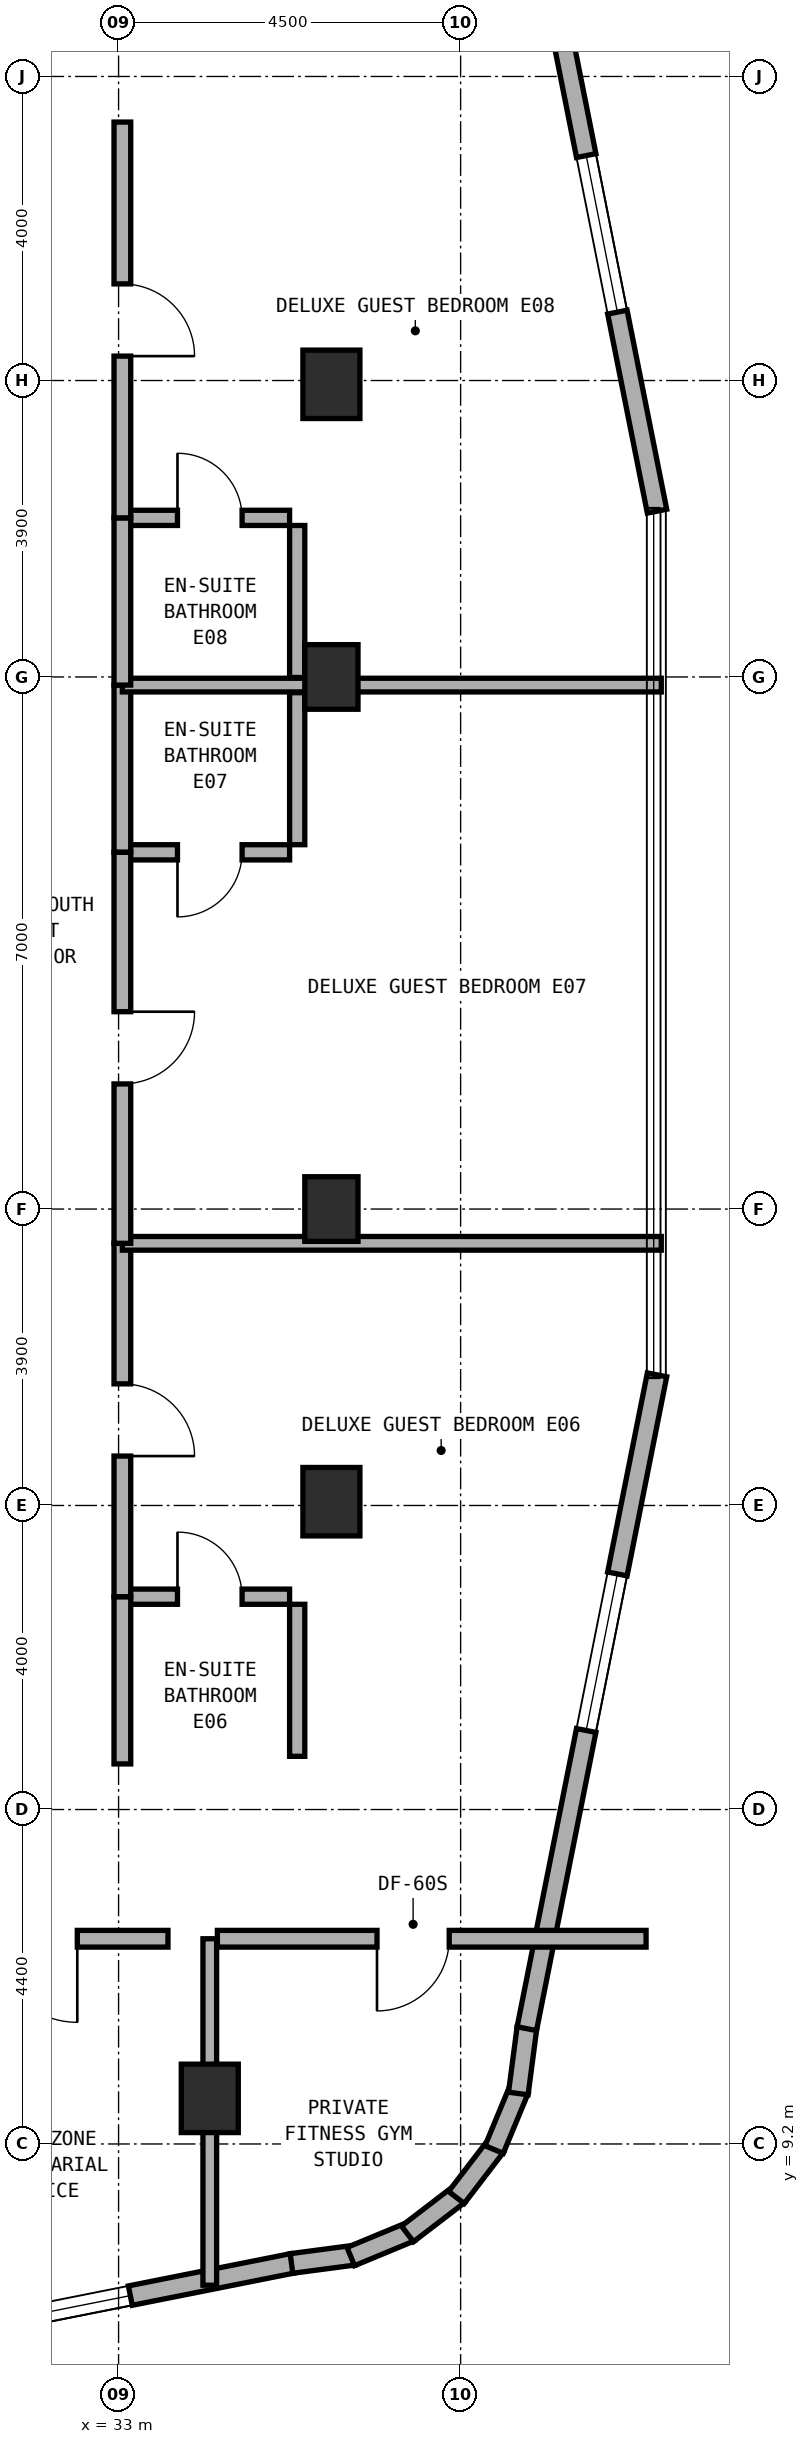
"""IFC4 building model, lengths in metres.
Left out: names, types, materials, properties, quantities, classifications, styles, units other than length and angle.
Written with IfcOpenShell. Run it as: python <this file> out.ifc"""

import sys

from ifc_helpers import new_model, si_unit, direction, frame, frame_2d, origin, origin_2d, place, context, subcontext, project, spatial, rectangle, extrude, element, fill, save


model = new_model("IFC4")
c1 = context("Model", 3, precision=1e-05, world=origin(), true_north=direction((0.0, 1.0)))
c2 = subcontext(c1, "Body", "Model", "MODEL_VIEW")
j1 = project(units=[si_unit("LENGTHUNIT", "METRE"), si_unit("PLANEANGLEUNIT", "RADIAN")], contexts=[c1])
p1 = place(None, origin())
s1 = spatial("IfcSite", under=j1, at=p1, CompositionType="ELEMENT")
p2 = place(p1, origin())
s2 = spatial("IfcBuilding", under=s1, at=p2, CompositionType="ELEMENT")
p3 = place(p2, frame((0.0, 0.0, 231.5)))
s3 = spatial("IfcBuildingStorey", under=s2, at=p3, CompositionType="ELEMENT", Elevation=231.5)
p4 = place(p3, frame((34.2, 9.8, 0.0), z_axis=(0.0, 0.0, 1.0), x_axis=(1.0, 0.0, 0.0)))
e1 = element("IfcColumn", 1, at=p4, inside=s3, PredefinedType="COLUMN", context=c2, shape_type="SweptSolid", body=[
    extrude(rectangle(XDim=0.75, YDim=0.9, at=origin_2d()), origin(), (0.0, 0.0, 1.0), 3.6),
])
for number, where, z_axis, x_axis in (
    (2, (35.8, 21.5, 0.0), (0.0, 0.0, 1.0), (1.0, 0.0, 0.0)),
    (3, (35.8, 28.5, 0.0), (0.0, 0.0, 1.0), (1.0, 0.0, 0.0)),
):
    element("IfcColumn", number, at=place(p3, frame(where, z_axis=z_axis, x_axis=x_axis)), inside=s3, PredefinedType="COLUMN", context=c2, shape_type="SweptSolid", body=[
        extrude(rectangle(XDim=0.7, YDim=0.85, at=origin_2d()), origin(), (0.0, 0.0, 1.0), 3.6),
    ])
for number, where, z_axis, x_axis in (
    (4, (35.8, 17.65, 0.0), (0.0, 0.0, 1.0), (1.0, 0.0, 0.0)),
    (5, (35.8, 32.35, 0.0), (0.0, 0.0, 1.0), (1.0, 0.0, 0.0)),
):
    element("IfcColumn", number, at=place(p3, frame(where, z_axis=z_axis, x_axis=x_axis)), inside=s3, PredefinedType="COLUMN", context=c2, shape_type="SweptSolid", body=[
        extrude(rectangle(XDim=0.75, YDim=0.9, at=origin_2d()), origin(), (0.0, 0.0, 1.0), 3.6),
    ])
p5 = place(p3, frame((26.71, 5.922, 0.0), z_axis=(0.0, 0.0, 1.0), x_axis=(0.980752174324, 0.195256683773, 0.0)))
e6 = element("IfcWall", 6, at=p5, inside=s3, PredefinedType="STANDARD", context=c2, shape_type="SweptSolid", body=[
    extrude(rectangle(XDim=8.741, YDim=0.26, at=frame_2d((4.371, 0.0))), origin(), (0.0, 0.0, 1.0), 3.32),
])
p6 = place(p5, frame((0.59, 0.0, 0.85)))
e7 = element("IfcOpeningElement", 7, at=p6, cuts=e6, PredefinedType="OPENING", context=c2, shape_type="SweptSolid", body=[
    extrude(rectangle(XDim=2.1, YDim=1.5, at=frame_2d((1.05, 0.75))), frame((0.0, 0.14, 0.0), z_axis=(0.0, -1.0, 0.0), x_axis=(1.0, 0.0, 0.0)), (0.0, 0.0, 1.0), 0.28),
])
p7 = place(p5, frame((4.471, 0.0, 0.85)))
e8 = element("IfcOpeningElement", 8, at=p7, cuts=e6, PredefinedType="OPENING", context=c2, shape_type="SweptSolid", body=[
    extrude(rectangle(XDim=2.1, YDim=1.5, at=frame_2d((1.05, 0.75))), frame((0.0, 0.14, 0.0), z_axis=(0.0, -1.0, 0.0), x_axis=(1.0, 0.0, 0.0)), (0.0, 0.0, 1.0), 0.28),
])
p8 = place(p3, frame((35.275, 7.628, 0.0), z_axis=(0.0, 0.0, 1.0), x_axis=(0.9913883573, 0.130954667764, 0.0)))
e9 = element("IfcWall", 9, at=p8, inside=s3, PredefinedType="STANDARD", context=c2, shape_type="SweptSolid", body=[
    extrude(rectangle(XDim=0.833, YDim=0.26, at=frame_2d((0.417, 0.0))), origin(), (0.0, 0.0, 1.0), 3.32),
])
p9 = place(p3, frame((36.055, 7.719, 0.0), z_axis=(0.0, 0.0, 1.0), x_axis=(0.923754491172, 0.382985169477, 0.0)))
e10 = element("IfcWall", 10, at=p9, inside=s3, PredefinedType="STANDARD", context=c2, shape_type="SweptSolid", body=[
    extrude(rectangle(XDim=0.851, YDim=0.26, at=frame_2d((0.426, 0.0))), origin(), (0.0, 0.0, 1.0), 3.32),
])
for number, where, z_axis, x_axis in (
    (11, (36.801, 8.017, 0.0), (0.0, 0.0, 1.0), (0.794, 0.608, 0.0)),
    (12, (37.445, 8.496, 0.0), (0.0, 0.0, 1.0), (0.608, 0.794, 0.0)),
):
    element("IfcWall", number, at=place(p3, frame(where, z_axis=z_axis, x_axis=x_axis)), inside=s3, PredefinedType="STANDARD", context=c2, shape_type="SweptSolid", body=[
        extrude(rectangle(XDim=0.85, YDim=0.26, at=frame_2d((0.425, 0.0))), origin(), (0.0, 0.0, 1.0), 3.32),
    ])
p10 = place(p3, frame((37.941, 9.127, 0.0), z_axis=(0.0, 0.0, 1.0), x_axis=(0.383229930484, 0.923652976167, 0.0)))
e13 = element("IfcWall", 13, at=p10, inside=s3, PredefinedType="STANDARD", context=c2, shape_type="SweptSolid", body=[
    extrude(rectangle(XDim=0.851, YDim=0.26, at=frame_2d((0.426, 0.0))), origin(), (0.0, 0.0, 1.0), 3.32),
])
p11 = place(p3, frame((38.259, 9.864, 0.0), z_axis=(0.0, 0.0, 1.0), x_axis=(0.130156359936, 0.991493480548, 0.0)))
e14 = element("IfcWall", 14, at=p11, inside=s3, PredefinedType="STANDARD", context=c2, shape_type="SweptSolid", body=[
    extrude(rectangle(XDim=0.868, YDim=0.26, at=frame_2d((0.434, 0.0))), origin(), (0.0, 0.0, 1.0), 3.32),
])
p12 = place(p3, frame((38.371, 10.717, 0.0), z_axis=(0.0, 0.0, 1.0), x_axis=(0.195291715883, 0.980745199176, 0.0)))
e15 = element("IfcWall", 15, at=p12, inside=s3, PredefinedType="STANDARD", context=c2, shape_type="SweptSolid", body=[
    extrude(rectangle(XDim=8.771, YDim=0.26, at=frame_2d((4.385, 0.0))), origin(), (0.0, 0.0, 1.0), 3.32),
])
p13 = place(p12, frame((4.0, 0.0, 0.85)))
e16 = element("IfcOpeningElement", 16, at=p13, cuts=e15, PredefinedType="OPENING", context=c2, shape_type="SweptSolid", body=[
    extrude(rectangle(XDim=2.1, YDim=1.5, at=frame_2d((1.05, 0.75))), frame((0.0, 0.14, 0.0), z_axis=(0.0, -1.0, 0.0), x_axis=(1.0, 0.0, 0.0)), (0.0, 0.0, 1.0), 0.28),
])
p14 = place(p3, frame((40.084, 30.681, 0.0), z_axis=(0.0, 0.0, 1.0), x_axis=(-0.195291715883, 0.980745199176, 0.0)))
e17 = element("IfcWall", 17, at=p14, inside=s3, PredefinedType="STANDARD", context=c2, shape_type="SweptSolid", body=[
    extrude(rectangle(XDim=8.771, YDim=0.26, at=frame_2d((4.385, 0.0))), origin(), (0.0, 0.0, 1.0), 3.32),
])
p15 = place(p14, frame((2.67, 0.0, 0.85)))
e18 = element("IfcOpeningElement", 18, at=p15, cuts=e17, PredefinedType="OPENING", context=c2, shape_type="SweptSolid", body=[
    extrude(rectangle(XDim=2.1, YDim=1.5, at=frame_2d((1.05, 0.75))), frame((0.0, 0.14, 0.0), z_axis=(0.0, -1.0, 0.0), x_axis=(1.0, 0.0, 0.0)), (0.0, 0.0, 1.0), 0.28),
])
p16 = place(p3, frame((30.4, 11.9, 0.0), z_axis=(0.0, 0.0, 1.0), x_axis=(1.0, 0.0, 0.0)))
e19 = element("IfcWall", 19, at=p16, inside=s3, PredefinedType="SOLIDWALL", context=c2, shape_type="SweptSolid", body=[
    extrude(rectangle(XDim=3.25, YDim=0.22, at=frame_2d((1.625, 0.0))), origin(), (0.0, 0.0, 1.0), 3.32),
])
p17 = place(p16, frame((0.957, 0.0, 0.0)))
e20 = element("IfcOpeningElement", 20, at=p17, cuts=e19, PredefinedType="OPENING", context=c2, shape_type="SweptSolid", body=[
    extrude(rectangle(XDim=1.1, YDim=2.1, at=frame_2d((0.55, 1.05))), frame((0.0, 0.12, 0.0), z_axis=(0.0, -1.0, 0.0), x_axis=(1.0, 0.0, 0.0)), (0.0, 0.0, 1.0), 0.24),
])
p18 = place(p3, frame((34.2, 7.342, 0.0), z_axis=(0.0, 0.0, 1.0), x_axis=(0.0, 1.0, 0.0)))
e21 = element("IfcWall", 21, at=p18, inside=s3, PredefinedType="SOLIDWALL", context=c2, shape_type="SweptSolid", body=[
    extrude(rectangle(XDim=4.558, YDim=0.18, at=frame_2d((2.279, 0.0))), origin(), (0.0, 0.0, 1.0), 2.745),
])
p19 = place(p3, frame((34.3, 11.9, 0.0), z_axis=(0.0, 0.0, 1.0), x_axis=(1.0, 0.0, 0.0)))
e22 = element("IfcWall", 22, at=p19, inside=s3, PredefinedType="SOLIDWALL", context=c2, shape_type="SweptSolid", body=[
    extrude(rectangle(XDim=5.64, YDim=0.22, at=frame_2d((2.82, 0.0))), origin(), (0.0, 0.0, 1.0), 3.015),
])
p20 = place(p19, frame((2.1, 0.0, 0.0)))
e23 = element("IfcOpeningElement", 23, at=p20, cuts=e22, PredefinedType="OPENING", context=c2, shape_type="SweptSolid", body=[
    extrude(rectangle(XDim=0.95, YDim=2.1, at=frame_2d((0.475, 1.05))), frame((0.0, 0.12, 0.0), z_axis=(0.0, -1.0, 0.0), x_axis=(1.0, 0.0, 0.0)), (0.0, 0.0, 1.0), 0.24),
])
p21 = place(p3, frame((33.15, 16.4, 0.0), z_axis=(0.0, 0.0, 1.0), x_axis=(1.0, 0.0, 0.0)))
e24 = element("IfcWall", 24, at=p21, inside=s3, PredefinedType="PLUMBINGWALL", context=c2, shape_type="SweptSolid", body=[
    extrude(rectangle(XDim=2.1, YDim=0.2, at=frame_2d((1.05, 0.0))), origin(), (0.0, 0.0, 1.0), 3.32),
])
p22 = place(p21, frame((0.625, 0.0, 0.0)))
e25 = element("IfcOpeningElement", 25, at=p22, cuts=e24, PredefinedType="OPENING", context=c2, shape_type="SweptSolid", body=[
    extrude(rectangle(XDim=0.85, YDim=2.1, at=frame_2d((0.425, 1.05))), frame((0.0, 0.11, 0.0), z_axis=(0.0, -1.0, 0.0), x_axis=(1.0, 0.0, 0.0)), (0.0, 0.0, 1.0), 0.22),
])
p23 = place(p3, frame((35.35, 14.3, 0.0), z_axis=(0.0, 0.0, 1.0), x_axis=(0.0, 1.0, 0.0)))
e26 = element("IfcWall", 26, at=p23, inside=s3, PredefinedType="PLUMBINGWALL", context=c2, shape_type="SweptSolid", body=[
    extrude(rectangle(XDim=2.0, YDim=0.2, at=frame_2d((1.0, 0.0))), origin(), (0.0, 0.0, 1.0), 3.015),
])
p24 = place(p3, frame((33.05, 14.2, 0.0), z_axis=(0.0, 0.0, 1.0), x_axis=(0.0, 1.0, 0.0)))
e27 = element("IfcWall", 27, at=p24, inside=s3, PredefinedType="SOLIDWALL", context=c2, shape_type="SweptSolid", body=[
    extrude(rectangle(XDim=2.2, YDim=0.22, at=frame_2d((1.1, 0.0))), origin(), (0.0, 0.0, 1.0), 3.32),
])
p25 = place(p3, frame((33.05, 16.4, 0.0), z_axis=(0.0, 0.0, 1.0), x_axis=(0.0, 1.0, 0.0)))
e28 = element("IfcWall", 28, at=p25, inside=s3, PredefinedType="SOLIDWALL", context=c2, shape_type="SweptSolid", body=[
    extrude(rectangle(XDim=4.649, YDim=0.22, at=frame_2d((2.325, 0.0))), origin(), (0.0, 0.0, 1.0), 2.745),
])
p26 = place(p25, frame((1.85, 0.0, 0.0)))
e29 = element("IfcOpeningElement", 29, at=p26, cuts=e28, PredefinedType="OPENING", context=c2, shape_type="SweptSolid", body=[
    extrude(rectangle(XDim=0.95, YDim=2.1, at=frame_2d((0.475, 1.05))), frame((0.0, 0.12, 0.0), z_axis=(0.0, -1.0, 0.0), x_axis=(1.0, 0.0, 0.0)), (0.0, 0.0, 1.0), 0.24),
])
p27 = place(p3, frame((33.05, 21.049, 0.0), z_axis=(0.0, 0.0, 1.0), x_axis=(1.0, 0.0, 0.0)))
e30 = element("IfcWall", 30, at=p27, inside=s3, PredefinedType="SOLIDWALL", context=c2, shape_type="SweptSolid", body=[
    extrude(rectangle(XDim=7.09, YDim=0.18, at=frame_2d((3.545, 0.0))), origin(), (0.0, 0.0, 1.0), 3.015),
])
p28 = place(p3, frame((33.15, 26.193, 0.0), z_axis=(0.0, 0.0, 1.0), x_axis=(1.0, 0.0, 0.0)))
e31 = element("IfcWall", 31, at=p28, inside=s3, PredefinedType="PLUMBINGWALL", context=c2, shape_type="SweptSolid", body=[
    extrude(rectangle(XDim=2.1, YDim=0.2, at=frame_2d((1.05, 0.0))), origin(), (0.0, 0.0, 1.0), 3.32),
])
p29 = place(p28, frame((0.625, 0.0, 0.0)))
e32 = element("IfcOpeningElement", 32, at=p29, cuts=e31, PredefinedType="OPENING", context=c2, shape_type="SweptSolid", body=[
    extrude(rectangle(XDim=0.85, YDim=2.1, at=frame_2d((0.425, 1.05))), frame((0.0, 0.11, 0.0), z_axis=(0.0, -1.0, 0.0), x_axis=(1.0, 0.0, 0.0)), (0.0, 0.0, 1.0), 0.22),
])
p30 = place(p3, frame((35.35, 26.293, 0.0), z_axis=(0.0, 0.0, 1.0), x_axis=(0.0, 1.0, 0.0)))
e33 = element("IfcWall", 33, at=p30, inside=s3, PredefinedType="PLUMBINGWALL", context=c2, shape_type="SweptSolid", body=[
    extrude(rectangle(XDim=2.0, YDim=0.2, at=frame_2d((1.0, 0.0))), origin(), (0.0, 0.0, 1.0), 3.32),
])
p31 = place(p3, frame((33.05, 26.193, 0.0), z_axis=(0.0, 0.0, 1.0), x_axis=(0.0, 1.0, 0.0)))
e34 = element("IfcWall", 34, at=p31, inside=s3, PredefinedType="SOLIDWALL", context=c2, shape_type="SweptSolid", body=[
    extrude(rectangle(XDim=2.2, YDim=0.22, at=frame_2d((1.1, 0.0))), origin(), (0.0, 0.0, 1.0), 3.32),
])
p32 = place(p3, frame((33.05, 21.049, 0.0), z_axis=(0.0, 0.0, 1.0), x_axis=(0.0, 1.0, 0.0)))
e35 = element("IfcWall", 35, at=p32, inside=s3, PredefinedType="SOLIDWALL", context=c2, shape_type="SweptSolid", body=[
    extrude(rectangle(XDim=5.144, YDim=0.22, at=frame_2d((2.572, 0.0))), origin(), (0.0, 0.0, 1.0), 2.745),
])
p33 = place(p32, frame((2.097, 0.0, 0.0)))
e36 = element("IfcOpeningElement", 36, at=p33, cuts=e35, PredefinedType="OPENING", context=c2, shape_type="SweptSolid", body=[
    extrude(rectangle(XDim=0.95, YDim=2.1, at=frame_2d((0.475, 1.05))), frame((0.0, 0.12, 0.0), z_axis=(0.0, -1.0, 0.0), x_axis=(1.0, 0.0, 0.0)), (0.0, 0.0, 1.0), 0.24),
])
p34 = place(p3, frame((33.05, 28.393, 0.0), z_axis=(0.0, 0.0, 1.0), x_axis=(1.0, 0.0, 0.0)))
e37 = element("IfcWall", 37, at=p34, inside=s3, PredefinedType="SOLIDWALL", context=c2, shape_type="SweptSolid", body=[
    extrude(rectangle(XDim=7.09, YDim=0.18, at=frame_2d((3.545, 0.0))), origin(), (0.0, 0.0, 1.0), 2.745),
])
p35 = place(p3, frame((33.15, 30.593, 0.0), z_axis=(0.0, 0.0, 1.0), x_axis=(1.0, 0.0, 0.0)))
e38 = element("IfcWall", 38, at=p35, inside=s3, PredefinedType="PLUMBINGWALL", context=c2, shape_type="SweptSolid", body=[
    extrude(rectangle(XDim=2.1, YDim=0.2, at=frame_2d((1.05, 0.0))), origin(), (0.0, 0.0, 1.0), 3.32),
])
p36 = place(p35, frame((0.625, 0.0, 0.0)))
e39 = element("IfcOpeningElement", 39, at=p36, cuts=e38, PredefinedType="OPENING", context=c2, shape_type="SweptSolid", body=[
    extrude(rectangle(XDim=0.85, YDim=2.1, at=frame_2d((0.425, 1.05))), frame((0.0, 0.11, 0.0), z_axis=(0.0, -1.0, 0.0), x_axis=(1.0, 0.0, 0.0)), (0.0, 0.0, 1.0), 0.22),
])
p37 = place(p3, frame((35.35, 28.493, 0.0), z_axis=(0.0, 0.0, 1.0), x_axis=(0.0, 1.0, 0.0)))
e40 = element("IfcWall", 40, at=p37, inside=s3, PredefinedType="PLUMBINGWALL", context=c2, shape_type="SweptSolid", body=[
    extrude(rectangle(XDim=2.0, YDim=0.2, at=frame_2d((1.0, 0.0))), origin(), (0.0, 0.0, 1.0), 2.745),
])
p38 = place(p3, frame((33.05, 28.393, 0.0), z_axis=(0.0, 0.0, 1.0), x_axis=(0.0, 1.0, 0.0)))
e41 = element("IfcWall", 41, at=p38, inside=s3, PredefinedType="SOLIDWALL", context=c2, shape_type="SweptSolid", body=[
    extrude(rectangle(XDim=2.2, YDim=0.22, at=frame_2d((1.1, 0.0))), origin(), (0.0, 0.0, 1.0), 2.745),
])
p39 = place(p3, frame((33.05, 30.593, 0.0), z_axis=(0.0, 0.0, 1.0), x_axis=(0.0, 1.0, 0.0)))
e42 = element("IfcWall", 42, at=p39, inside=s3, PredefinedType="SOLIDWALL", context=c2, shape_type="SweptSolid", body=[
    extrude(rectangle(XDim=5.207, YDim=0.22, at=frame_2d((2.604, 0.0))), origin(), (0.0, 0.0, 1.0), 2.745),
])
p40 = place(p39, frame((2.128, 0.0, 0.0)))
e43 = element("IfcOpeningElement", 43, at=p40, cuts=e42, PredefinedType="OPENING", context=c2, shape_type="SweptSolid", body=[
    extrude(rectangle(XDim=0.95, YDim=2.1, at=frame_2d((0.475, 1.05))), frame((0.0, 0.12, 0.0), z_axis=(0.0, -1.0, 0.0), x_axis=(1.0, 0.0, 0.0)), (0.0, 0.0, 1.0), 0.24),
])
p41 = place(p7, origin())
e44 = element("IfcWindow", 44, at=p41, inside=s3, PartitioningType="SINGLE_PANEL", PredefinedType="WINDOW", context=c2, shape_type="SweptSolid", body=[
    extrude(rectangle(XDim=2.1, YDim=1.5, at=frame_2d((1.05, 0.75))), frame((0.0, 0.03, 0.0), z_axis=(0.0, -1.0, 0.0), x_axis=(1.0, 0.0, 0.0)), (0.0, 0.0, 1.0), 0.06),
])
fill(e8, e44)
p42 = place(p13, origin())
e45 = element("IfcWindow", 45, at=p42, inside=s3, PartitioningType="SINGLE_PANEL", PredefinedType="WINDOW", context=c2, shape_type="SweptSolid", body=[
    extrude(rectangle(XDim=2.1, YDim=1.5, at=frame_2d((1.05, 0.75))), frame((0.0, 0.03, 0.0), z_axis=(0.0, -1.0, 0.0), x_axis=(1.0, 0.0, 0.0)), (0.0, 0.0, 1.0), 0.06),
])
fill(e16, e45)
p43 = place(p15, origin())
e46 = element("IfcWindow", 46, at=p43, inside=s3, PartitioningType="SINGLE_PANEL", PredefinedType="WINDOW", context=c2, shape_type="SweptSolid", body=[
    extrude(rectangle(XDim=2.1, YDim=1.5, at=frame_2d((1.05, 0.75))), frame((0.0, 0.03, 0.0), z_axis=(0.0, -1.0, 0.0), x_axis=(1.0, 0.0, 0.0)), (0.0, 0.0, 1.0), 0.06),
])
fill(e18, e46)
p44 = place(p17, frame((1.1, 0.0, 0.0), z_axis=(0.0, 0.0, 1.0), x_axis=(-1.0, 0.0, 0.0)))
e47 = element("IfcDoor", 47, at=p44, inside=s3, OperationType="SINGLE_SWING_LEFT", PredefinedType="DOOR", context=c2, shape_type="SweptSolid", body=[
    extrude(rectangle(XDim=1.1, YDim=2.1, at=frame_2d((0.55, 1.05))), frame((0.0, 0.025, 0.0), z_axis=(0.0, -1.0, 0.0), x_axis=(1.0, 0.0, 0.0)), (0.0, 0.0, 1.0), 0.05),
])
fill(e20, e47)
p45 = place(p20, frame((0.95, 0.0, 0.0), z_axis=(0.0, 0.0, 1.0), x_axis=(-1.0, 0.0, 0.0)))
e48 = element("IfcDoor", 48, at=p45, inside=s3, OperationType="SINGLE_SWING_RIGHT", PredefinedType="DOOR", context=c2, shape_type="SweptSolid", body=[
    extrude(rectangle(XDim=0.95, YDim=2.1, at=frame_2d((0.475, 1.05))), frame((0.0, 0.025, 0.0), z_axis=(0.0, -1.0, 0.0), x_axis=(1.0, 0.0, 0.0)), (0.0, 0.0, 1.0), 0.05),
])
fill(e23, e48)
p46 = place(p22, origin())
e49 = element("IfcDoor", 49, at=p46, inside=s3, OperationType="SINGLE_SWING_LEFT", PredefinedType="DOOR", context=c2, shape_type="SweptSolid", body=[
    extrude(rectangle(XDim=0.85, YDim=2.1, at=frame_2d((0.425, 1.05))), frame((0.0, 0.025, 0.0), z_axis=(0.0, -1.0, 0.0), x_axis=(1.0, 0.0, 0.0)), (0.0, 0.0, 1.0), 0.05),
])
fill(e25, e49)
p47 = place(p26, frame((0.95, 0.0, 0.0), z_axis=(0.0, 0.0, 1.0), x_axis=(-1.0, 0.0, 0.0)))
e50 = element("IfcDoor", 50, at=p47, inside=s3, OperationType="SINGLE_SWING_RIGHT", PredefinedType="DOOR", context=c2, shape_type="SweptSolid", body=[
    extrude(rectangle(XDim=0.95, YDim=2.1, at=frame_2d((0.475, 1.05))), frame((0.0, 0.025, 0.0), z_axis=(0.0, -1.0, 0.0), x_axis=(1.0, 0.0, 0.0)), (0.0, 0.0, 1.0), 0.05),
])
fill(e29, e50)
p48 = place(p29, frame((0.85, 0.0, 0.0), z_axis=(0.0, 0.0, 1.0), x_axis=(-1.0, 0.0, 0.0)))
e51 = element("IfcDoor", 51, at=p48, inside=s3, OperationType="SINGLE_SWING_RIGHT", PredefinedType="DOOR", context=c2, shape_type="SweptSolid", body=[
    extrude(rectangle(XDim=0.85, YDim=2.1, at=frame_2d((0.425, 1.05))), frame((0.0, 0.025, 0.0), z_axis=(0.0, -1.0, 0.0), x_axis=(1.0, 0.0, 0.0)), (0.0, 0.0, 1.0), 0.05),
])
fill(e32, e51)
p49 = place(p33, frame((0.95, 0.0, 0.0), z_axis=(0.0, 0.0, 1.0), x_axis=(-1.0, 0.0, 0.0)))
e52 = element("IfcDoor", 52, at=p49, inside=s3, OperationType="SINGLE_SWING_LEFT", PredefinedType="DOOR", context=c2, shape_type="SweptSolid", body=[
    extrude(rectangle(XDim=0.95, YDim=2.1, at=frame_2d((0.475, 1.05))), frame((0.0, 0.025, 0.0), z_axis=(0.0, -1.0, 0.0), x_axis=(1.0, 0.0, 0.0)), (0.0, 0.0, 1.0), 0.05),
])
fill(e36, e52)
p50 = place(p36, origin())
e53 = element("IfcDoor", 53, at=p50, inside=s3, OperationType="SINGLE_SWING_LEFT", PredefinedType="DOOR", context=c2, shape_type="SweptSolid", body=[
    extrude(rectangle(XDim=0.85, YDim=2.1, at=frame_2d((0.425, 1.05))), frame((0.0, 0.025, 0.0), z_axis=(0.0, -1.0, 0.0), x_axis=(1.0, 0.0, 0.0)), (0.0, 0.0, 1.0), 0.05),
])
fill(e39, e53)
p51 = place(p40, frame((0.95, 0.0, 0.0), z_axis=(0.0, 0.0, 1.0), x_axis=(-1.0, 0.0, 0.0)))
e54 = element("IfcDoor", 54, at=p51, inside=s3, OperationType="SINGLE_SWING_RIGHT", PredefinedType="DOOR", context=c2, shape_type="SweptSolid", body=[
    extrude(rectangle(XDim=0.95, YDim=2.1, at=frame_2d((0.475, 1.05))), frame((0.0, 0.025, 0.0), z_axis=(0.0, -1.0, 0.0), x_axis=(1.0, 0.0, 0.0)), (0.0, 0.0, 1.0), 0.05),
])
fill(e43, e54)
save(model, sys.argv[1])
